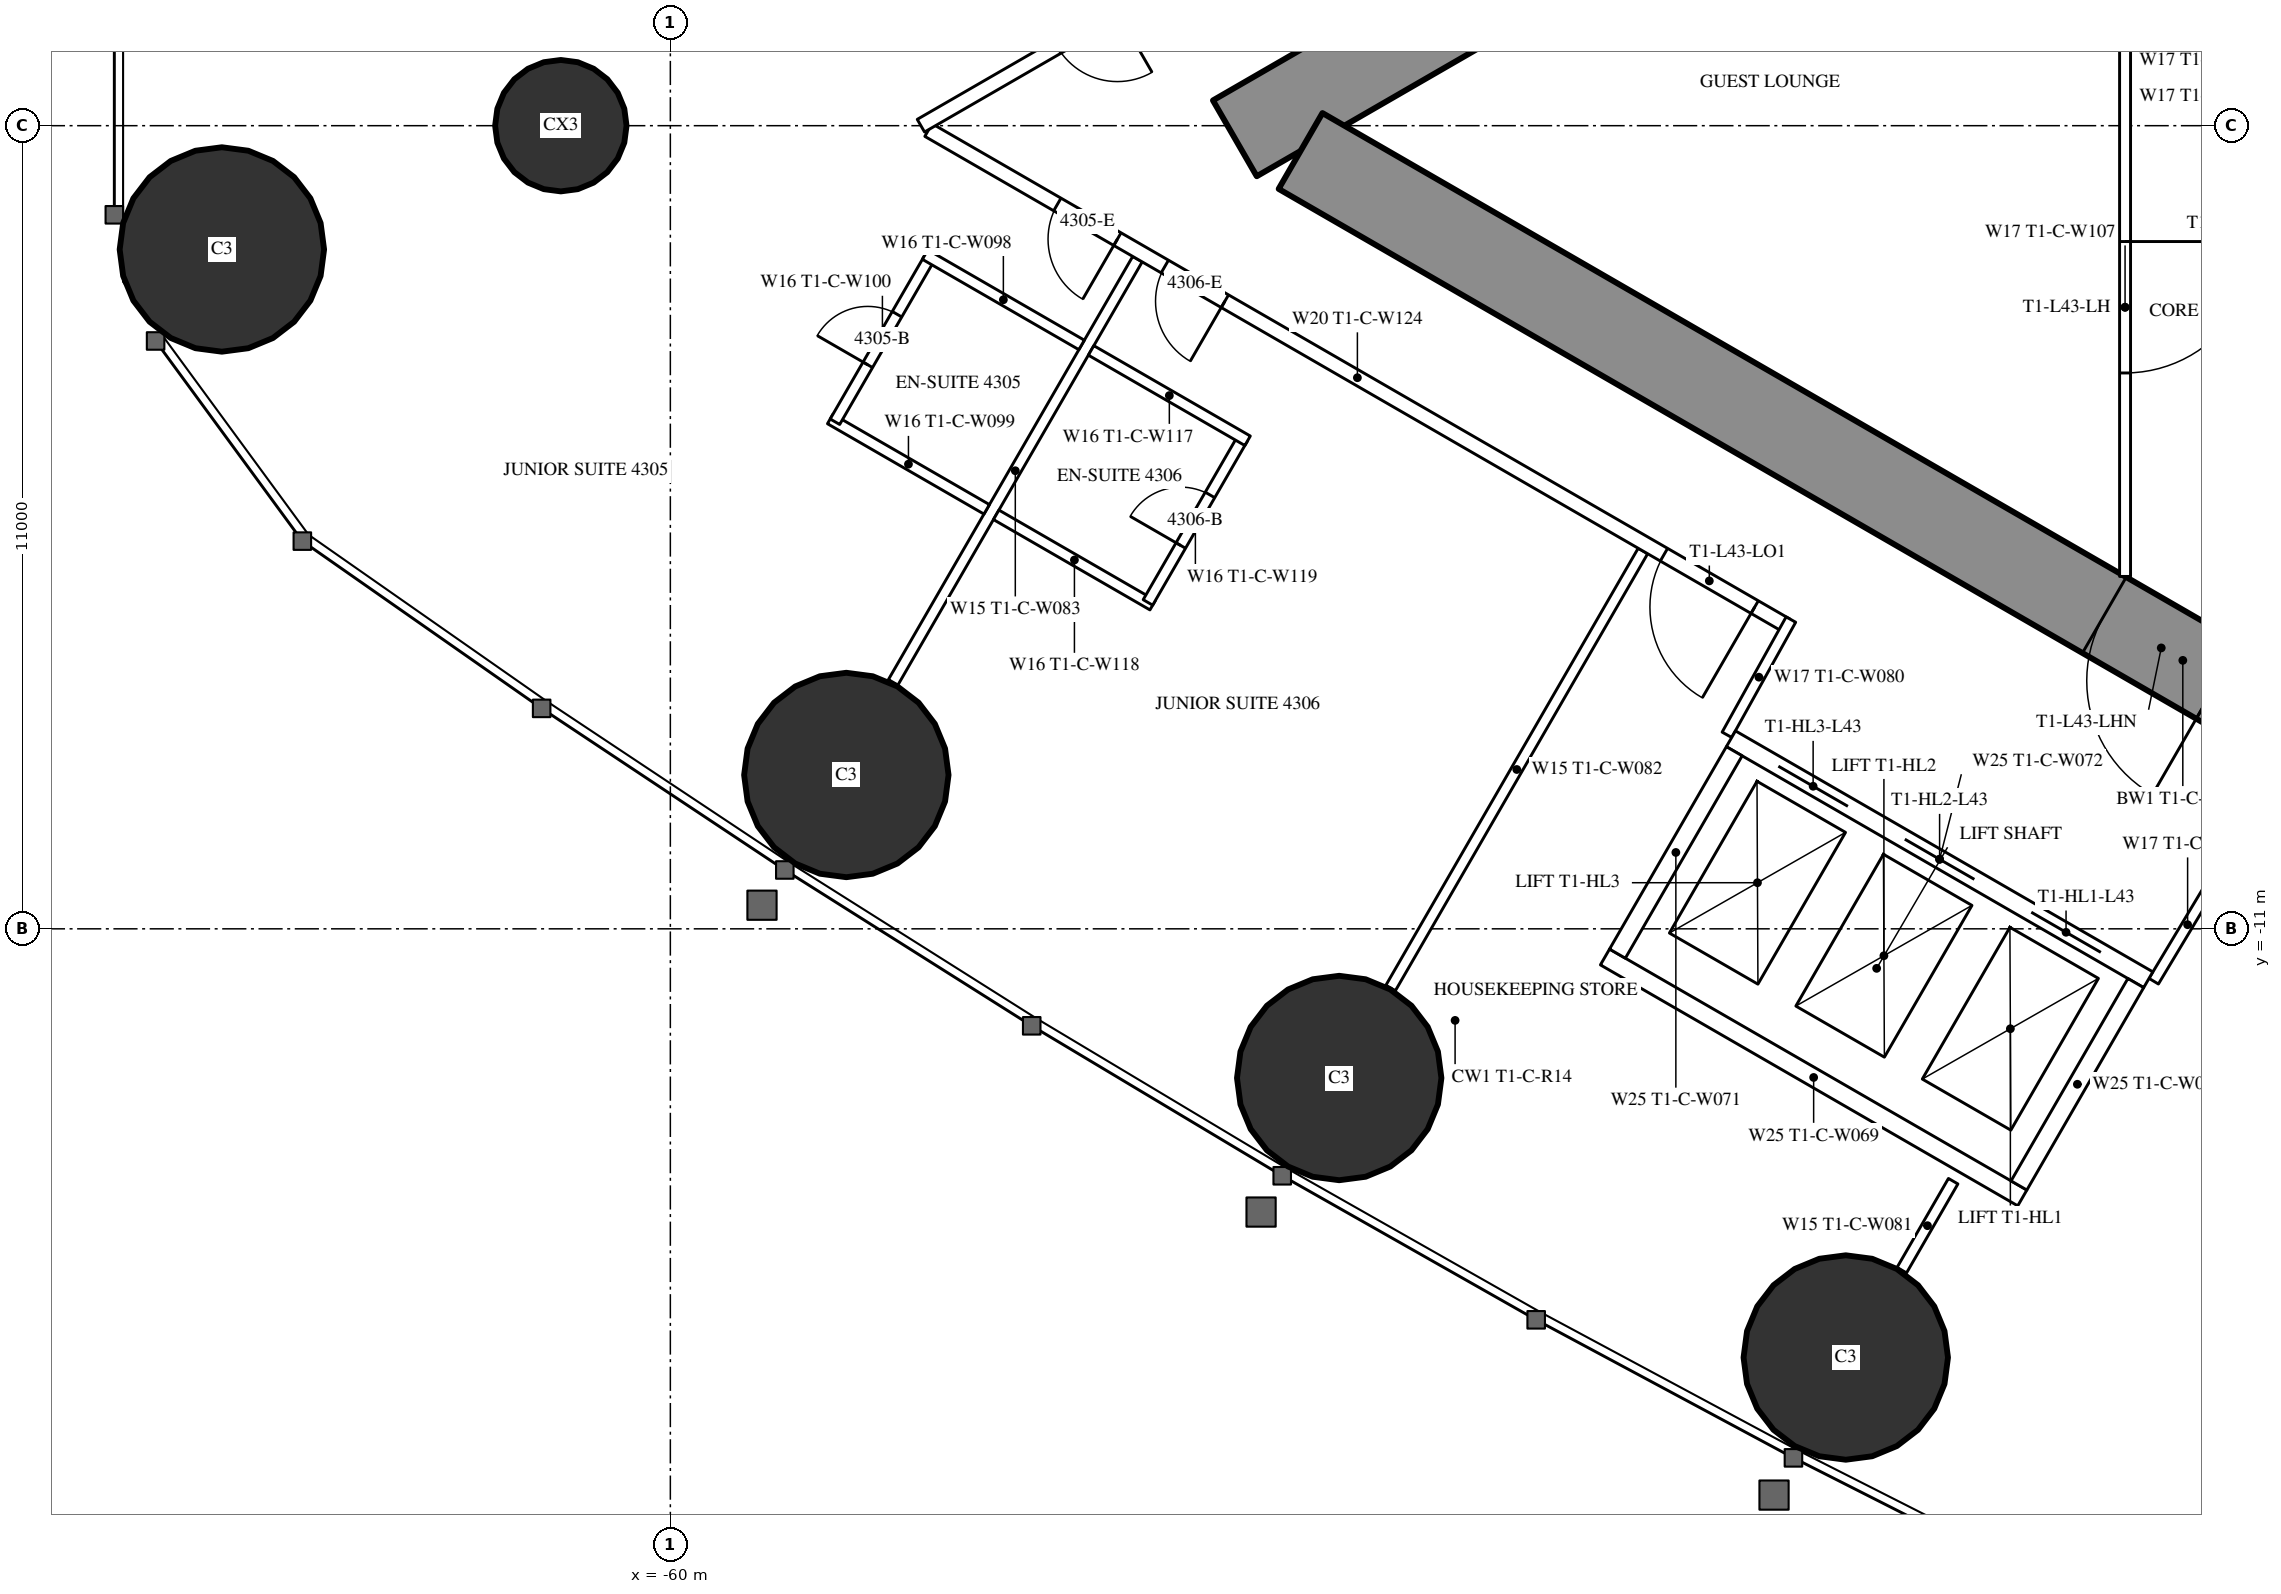
"""IFC4 building model, lengths in metres.
Left out: names, types, materials, properties, quantities, classifications, styles, units other than length and angle.
Written with IfcOpenShell. Run it as: python <this file> out.ifc"""

import sys

from ifc_helpers import new_model, si_unit, direction, frame, frame_2d, origin, origin_2d, place, context, subcontext, project, spatial, rectangle, circle, extrude, element, fill, save


model = new_model("IFC4")
c1 = context("Model", 3, precision=1e-05, world=origin(), true_north=direction((0.0, 1.0)))
c2 = subcontext(c1, "Body", "Model", "MODEL_VIEW")
j1 = project(units=[si_unit("LENGTHUNIT", "METRE"), si_unit("PLANEANGLEUNIT", "RADIAN")], contexts=[c1])
p1 = place(None, origin())
s1 = spatial("IfcSite", under=j1, at=p1, CompositionType="ELEMENT")
p2 = place(p1, origin())
s2 = spatial("IfcBuilding", under=s1, at=p2, CompositionType="ELEMENT")
p3 = place(p2, frame((0.0, 0.0, 163.3)))
s3 = spatial("IfcBuildingStorey", under=s2, at=p3, CompositionType="ELEMENT", Elevation=163.3)
for number, where, z_axis, x_axis in (
    (1, (-66.143, -1.695, 0.0), (0.0, 0.0, 1.0), (1.0, 0.0, 0.0)),
    (2, (-57.59, -8.893, 0.0), (0.0, 0.0, 1.0), (1.0, 0.0, 0.0)),
    (3, (-50.839, -13.043, 0.0), (0.0, 0.0, 1.0), (1.0, 0.0, 0.0)),
    (4, (-43.9, -16.871, 0.0), (0.0, 0.0, 1.0), (1.0, 0.0, 0.0)),
):
    element("IfcColumn", number, at=place(p3, frame(where, z_axis=z_axis, x_axis=x_axis)), inside=s3, PredefinedType="COLUMN", context=c2, shape_type="SweptSolid", body=[
        extrude(circle(Radius=1.4, at=origin_2d()), origin(), (0.0, 0.0, 1.0), 3.5),
    ])
p4 = place(p3, frame((-61.5, 0.0, 0.0), z_axis=(0.0, 0.0, 1.0), x_axis=(1.0, 0.0, 0.0)))
e5 = element("IfcColumn", 5, at=p4, inside=s3, PredefinedType="COLUMN", context=c2, shape_type="SweptSolid", body=[
    extrude(circle(Radius=0.9, at=origin_2d()), origin(), (0.0, 0.0, 1.0), 3.5),
])
p5 = place(p3, frame((-27.2, 14.3, 0.0), z_axis=(0.0, 0.0, 1.0), x_axis=(-0.866026593062, -0.499997940104, 0.0)))
e6 = element("IfcWall", 6, at=p5, inside=s3, PredefinedType="SHEAR", context=c2, shape_type="SweptSolid", body=[
    extrude(rectangle(XDim=28.946, YDim=1.2, at=frame_2d((14.473, 0.0))), origin(), (0.0, 0.0, 1.0), 3.5),
])
p6 = place(p5, frame((4.6, 0.0, 0.0)))
e7 = element("IfcOpeningElement", 7, at=p6, cuts=e6, PredefinedType="OPENING", context=c2, shape_type="SweptSolid", body=[
    extrude(rectangle(XDim=1.0, YDim=2.2, at=frame_2d((0.5, 1.1))), frame((0.0, 0.61, 0.0), z_axis=(0.0, -1.0, 0.0), x_axis=(1.0, 0.0, 0.0)), (0.0, 0.0, 1.0), 1.22),
])
p7 = place(p5, frame((13.395, 0.0, 0.0)))
e8 = element("IfcOpeningElement", 8, at=p7, cuts=e6, PredefinedType="OPENING", context=c2, shape_type="SweptSolid", body=[
    extrude(rectangle(XDim=1.8, YDim=2.2, at=frame_2d((0.9, 1.1))), frame((0.0, 0.61, 0.0), z_axis=(0.0, -1.0, 0.0), x_axis=(1.0, 0.0, 0.0)), (0.0, 0.0, 1.0), 1.22),
])
p8 = place(p3, frame((-27.2, -14.3, 0.0), z_axis=(0.0, 0.0, 1.0), x_axis=(-0.866024021859, 0.500002393557, 0.0)))
e9 = element("IfcWall", 9, at=p8, inside=s3, PredefinedType="SHEAR", context=c2, shape_type="SweptSolid", body=[
    extrude(rectangle(XDim=27.907, YDim=1.2, at=frame_2d((13.954, 0.0))), origin(), (0.0, 0.0, 1.0), 3.5),
])
p9 = place(p8, frame((4.6, 0.0, 0.0)))
e10 = element("IfcOpeningElement", 10, at=p9, cuts=e9, PredefinedType="OPENING", context=c2, shape_type="SweptSolid", body=[
    extrude(rectangle(XDim=1.0, YDim=2.2, at=frame_2d((0.5, 1.1))), frame((0.0, 0.61, 0.0), z_axis=(0.0, -1.0, 0.0), x_axis=(1.0, 0.0, 0.0)), (0.0, 0.0, 1.0), 1.22),
])
p10 = place(p8, frame((13.395, 0.0, 0.0)))
e11 = element("IfcOpeningElement", 11, at=p10, cuts=e9, PredefinedType="OPENING", context=c2, shape_type="SweptSolid", body=[
    extrude(rectangle(XDim=1.8, YDim=2.2, at=frame_2d((0.9, 1.1))), frame((0.0, 0.61, 0.0), z_axis=(0.0, -1.0, 0.0), x_axis=(1.0, 0.0, 0.0)), (0.0, 0.0, 1.0), 1.22),
])
p11 = place(p3, frame((-46.679, -5.825, 0.0), z_axis=(0.0, 0.0, 1.0), x_axis=(-0.500006839597, -0.866021454905, 0.0)))
e12 = element("IfcWall", 12, at=p11, inside=s3, PredefinedType="PARTITIONING", context=c2, shape_type="SweptSolid", body=[
    extrude(rectangle(XDim=6.911, YDim=0.15, at=frame_2d((3.456, 0.0))), origin(), (0.0, 0.0, 1.0), 2.3),
])
p12 = place(p3, frame((-53.602, -1.828, 0.0), z_axis=(0.0, 0.0, 1.0), x_axis=(-0.49999191814, -0.866030069798, 0.0)))
e13 = element("IfcWall", 13, at=p12, inside=s3, PredefinedType="PARTITIONING", context=c2, shape_type="SweptSolid", body=[
    extrude(rectangle(XDim=6.692, YDim=0.15, at=frame_2d((3.346, 0.0))), origin(), (0.0, 0.0, 1.0), 2.3),
])
p13 = place(p3, frame((-42.429, -14.457, 0.0), z_axis=(0.0, 0.0, 1.0), x_axis=(-0.5000578829, -0.865991982497, 0.0)))
e14 = element("IfcWall", 14, at=p13, inside=s3, PredefinedType="PARTITIONING", context=c2, shape_type="SweptSolid", body=[
    extrude(rectangle(XDim=1.407, YDim=0.15, at=frame_2d((0.704, 0.0))), origin(), (0.0, 0.0, 1.0), 3.25),
])
p14 = place(p3, frame((-44.715, -6.844, 0.0), z_axis=(0.0, 0.0, 1.0), x_axis=(-0.866025261224, 0.500000246922, 0.0)))
e15 = element("IfcWall", 15, at=p14, inside=s3, PredefinedType="PARTITIONING", context=c2, shape_type="SweptSolid", body=[
    extrude(rectangle(XDim=13.567, YDim=0.2, at=frame_2d((6.783, 0.0))), origin(), (0.0, 0.0, 1.0), 3.25),
])
p15 = place(p14, frame((10.579, 0.0, 0.0)))
e16 = element("IfcOpeningElement", 16, at=p15, cuts=e15, PredefinedType="OPENING", context=c2, shape_type="SweptSolid", body=[
    extrude(rectangle(XDim=0.95, YDim=2.2, at=frame_2d((0.475, 1.1))), frame((0.0, 0.11, 0.0), z_axis=(0.0, -1.0, 0.0), x_axis=(1.0, 0.0, 0.0)), (0.0, 0.0, 1.0), 0.22),
])
p16 = place(p14, frame((8.879, 0.0, 0.0)))
e17 = element("IfcOpeningElement", 17, at=p16, cuts=e15, PredefinedType="OPENING", context=c2, shape_type="SweptSolid", body=[
    extrude(rectangle(XDim=0.95, YDim=2.2, at=frame_2d((0.475, 1.1))), frame((0.0, 0.11, 0.0), z_axis=(0.0, -1.0, 0.0), x_axis=(1.0, 0.0, 0.0)), (0.0, 0.0, 1.0), 0.22),
])
p17 = place(p14, frame((0.5, 0.0, 0.0)))
e18 = element("IfcOpeningElement", 18, at=p17, cuts=e15, PredefinedType="OPENING", context=c2, shape_type="SweptSolid", body=[
    extrude(rectangle(XDim=1.435, YDim=2.2, at=frame_2d((0.718, 1.1))), frame((0.0, 0.11, 0.0), z_axis=(0.0, -1.0, 0.0), x_axis=(1.0, 0.0, 0.0)), (0.0, 0.0, 1.0), 0.22),
])
for number, where, z_axis, x_axis in (
    (19, (-39.683, -11.718, 0.0), (0.0, 0.0, 1.0), (0.514, 0.858, 0.0)),
    (20, (-44.652, -6.764, 0.0), (0.0, 0.0, 1.0), (-0.485, -0.874, 0.0)),
):
    element("IfcWall", number, at=place(p3, frame(where, z_axis=z_axis, x_axis=x_axis)), inside=s3, PredefinedType="PARTITIONING", context=c2, shape_type="SweptSolid", body=[
        extrude(rectangle(XDim=1.805, YDim=0.15, at=frame_2d((0.903, 0.0))), origin(), (0.0, 0.0, 1.0), 3.25),
    ])
p18 = place(p3, frame((-46.65, 5.726, 0.0), z_axis=(0.0, 0.0, 1.0), x_axis=(-0.866027963864, -0.499995565786, 0.0)))
e21 = element("IfcWall", 21, at=p18, inside=s3, PredefinedType="PARTITIONING", context=c2, shape_type="SweptSolid", body=[
    extrude(rectangle(XDim=11.452, YDim=0.2, at=frame_2d((5.726, 0.0))), origin(), (0.0, 0.0, 1.0), 3.25),
])
p19 = place(p18, frame((4.294, 0.0, 0.0)))
e22 = element("IfcOpeningElement", 22, at=p19, cuts=e21, PredefinedType="OPENING", context=c2, shape_type="SweptSolid", body=[
    extrude(rectangle(XDim=0.95, YDim=2.2, at=frame_2d((0.475, 1.1))), frame((0.0, 0.11, 0.0), z_axis=(0.0, -1.0, 0.0), x_axis=(1.0, 0.0, 0.0)), (0.0, 0.0, 1.0), 0.22),
])
p20 = place(p18, frame((8.344, 0.0, 0.0)))
e23 = element("IfcOpeningElement", 23, at=p20, cuts=e21, PredefinedType="OPENING", context=c2, shape_type="SweptSolid", body=[
    extrude(rectangle(XDim=0.95, YDim=2.2, at=frame_2d((0.475, 1.1))), frame((0.0, 0.11, 0.0), z_axis=(0.0, -1.0, 0.0), x_axis=(1.0, 0.0, 0.0)), (0.0, 0.0, 1.0), 0.22),
])
p21 = place(p3, frame((-55.667, -5.255, 0.0), z_axis=(0.0, 0.0, 1.0), x_axis=(-0.866006523861, 0.500032699561, 0.0)))
e24 = element("IfcWall", 24, at=p21, inside=s3, PredefinedType="PARTITIONING", context=c2, shape_type="SweptSolid", body=[
    extrude(rectangle(XDim=2.475, YDim=0.15, at=frame_2d((1.237, 0.0))), origin(), (0.0, 0.0, 1.0), 3.25),
])
p22 = place(p3, frame((-56.446, -1.803, 0.0), z_axis=(0.0, 0.0, 1.0), x_axis=(-0.499936506574, -0.866062058628, 0.0)))
e25 = element("IfcWall", 25, at=p22, inside=s3, PredefinedType="PARTITIONING", context=c2, shape_type="SweptSolid", body=[
    extrude(rectangle(XDim=2.6, YDim=0.15, at=frame_2d((1.3, 0.0))), origin(), (0.0, 0.0, 1.0), 3.25),
])
p23 = place(p22, frame((0.9, 0.0, 0.0)))
e26 = element("IfcOpeningElement", 26, at=p23, cuts=e25, PredefinedType="OPENING", context=c2, shape_type="SweptSolid", body=[
    extrude(rectangle(XDim=0.8, YDim=2.2, at=frame_2d((0.4, 1.1))), frame((0.0, 0.085, 0.0), z_axis=(0.0, -1.0, 0.0), x_axis=(1.0, 0.0, 0.0)), (0.0, 0.0, 1.0), 0.17),
])
for number, where, z_axis, x_axis in (
    (27, (-54.367, -3.003, 0.0), (0.0, 0.0, 1.0), (-0.866, 0.5, 0.0)),
    (28, (-53.394, -6.567, 0.0), (0.0, 0.0, 1.0), (-0.866, 0.5, 0.0)),
):
    element("IfcWall", number, at=place(p3, frame(where, z_axis=z_axis, x_axis=x_axis)), inside=s3, PredefinedType="PARTITIONING", context=c2, shape_type="SweptSolid", body=[
        extrude(rectangle(XDim=2.475, YDim=0.15, at=frame_2d((1.238, 0.0))), origin(), (0.0, 0.0, 1.0), 3.25),
    ])
p24 = place(p3, frame((-52.159, -4.278, 0.0), z_axis=(0.0, 0.0, 1.0), x_axis=(-0.500047596559, -0.865997922154, 0.0)))
e29 = element("IfcWall", 29, at=p24, inside=s3, PredefinedType="PARTITIONING", context=c2, shape_type="SweptSolid", body=[
    extrude(rectangle(XDim=2.6, YDim=0.15, at=frame_2d((1.3, 0.0))), origin(), (0.0, 0.0, 1.0), 3.25),
])
p25 = place(p24, frame((0.9, 0.0, 0.0)))
e30 = element("IfcOpeningElement", 30, at=p25, cuts=e29, PredefinedType="OPENING", context=c2, shape_type="SweptSolid", body=[
    extrude(rectangle(XDim=0.8, YDim=2.2, at=frame_2d((0.4, 1.1))), frame((0.0, 0.085, 0.0), z_axis=(0.0, -1.0, 0.0), x_axis=(1.0, 0.0, 0.0)), (0.0, 0.0, 1.0), 0.17),
])
p26 = place(p3, frame((-52.094, -4.315, 0.0), z_axis=(0.0, 0.0, 1.0), x_axis=(-0.866006523861, 0.500032699561, 0.0)))
e31 = element("IfcWall", 31, at=p26, inside=s3, PredefinedType="PARTITIONING", context=c2, shape_type="SweptSolid", body=[
    extrude(rectangle(XDim=2.475, YDim=0.15, at=frame_2d((1.237, 0.0))), origin(), (0.0, 0.0, 1.0), 2.45),
])
p27 = place(p3, frame((-40.075, 1.2, 0.0), z_axis=(0.0, 0.0, 1.0), x_axis=(0.0, -1.0, 0.0)))
e32 = element("IfcWall", 32, at=p27, inside=s3, PredefinedType="PARTITIONING", context=c2, shape_type="SweptSolid", body=[
    extrude(rectangle(XDim=7.374, YDim=0.15, at=frame_2d((3.687, 0.0))), origin(), (0.0, 0.0, 1.0), 3.25),
])
p28 = place(p27, frame((2.787, 0.0, 0.0)))
e33 = element("IfcOpeningElement", 33, at=p28, cuts=e32, PredefinedType="OPENING", context=c2, shape_type="SweptSolid", body=[
    extrude(rectangle(XDim=1.8, YDim=2.2, at=frame_2d((0.9, 1.1))), frame((0.0, 0.085, 0.0), z_axis=(0.0, -1.0, 0.0), x_axis=(1.0, 0.0, 0.0)), (0.0, 0.0, 1.0), 0.17),
])
p29 = place(p3, frame((-39.758, -11.697, 0.0), z_axis=(0.0, 0.0, 1.0), x_axis=(-0.866024194504, 0.500002094529, 0.0)))
e34 = element("IfcWall", 34, at=p29, inside=s3, PredefinedType="PARTITIONING", context=c2, shape_type="SweptSolid", body=[
    extrude(rectangle(XDim=6.6, YDim=0.25, at=frame_2d((3.3, 0.0))), origin(), (0.0, 0.0, 1.0), 3.25),
])
p30 = place(p29, frame((0.75, 0.0, 0.0)))
e35 = element("IfcOpeningElement", 35, at=p30, cuts=e34, PredefinedType="OPENING", context=c2, shape_type="SweptSolid", body=[
    extrude(rectangle(XDim=1.1, YDim=2.2, at=frame_2d((0.55, 1.1))), frame((0.0, 0.135, 0.0), z_axis=(0.0, -1.0, 0.0), x_axis=(1.0, 0.0, 0.0)), (0.0, 0.0, 1.0), 0.27),
])
p31 = place(p29, frame((2.75, 0.0, 0.0)))
e36 = element("IfcOpeningElement", 36, at=p31, cuts=e34, PredefinedType="OPENING", context=c2, shape_type="SweptSolid", body=[
    extrude(rectangle(XDim=1.1, YDim=2.2, at=frame_2d((0.55, 1.1))), frame((0.0, 0.135, 0.0), z_axis=(0.0, -1.0, 0.0), x_axis=(1.0, 0.0, 0.0)), (0.0, 0.0, 1.0), 0.27),
])
p32 = place(p29, frame((4.75, 0.0, 0.0)))
e37 = element("IfcOpeningElement", 37, at=p32, cuts=e34, PredefinedType="OPENING", context=c2, shape_type="SweptSolid", body=[
    extrude(rectangle(XDim=1.1, YDim=2.2, at=frame_2d((0.55, 1.1))), frame((0.0, 0.135, 0.0), z_axis=(0.0, -1.0, 0.0), x_axis=(1.0, 0.0, 0.0)), (0.0, 0.0, 1.0), 0.27),
])
p33 = place(p3, frame((-41.482, -14.686, 0.0), z_axis=(0.0, 0.0, 1.0), x_axis=(-0.86603344179, 0.499986077507, 0.0)))
e38 = element("IfcWall", 38, at=p33, inside=s3, PredefinedType="PARTITIONING", context=c2, shape_type="SweptSolid", body=[
    extrude(rectangle(XDim=6.6, YDim=0.25, at=frame_2d((3.3, 0.0))), origin(), (0.0, 0.0, 1.0), 3.25),
])
for number, where, z_axis, x_axis in (
    (39, (-39.928, -11.743, 0.0), (0.0, 0.0, 1.0), (-0.5, -0.866, 0.0)),
    (40, (-45.428, -8.568, 0.0), (0.0, 0.0, 1.0), (-0.5, -0.866, 0.0)),
):
    element("IfcWall", number, at=place(p3, frame(where, z_axis=z_axis, x_axis=x_axis)), inside=s3, PredefinedType="PARTITIONING", context=c2, shape_type="SweptSolid", body=[
        extrude(rectangle(XDim=3.201, YDim=0.25, at=frame_2d((1.6, 0.0))), origin(), (0.0, 0.0, 1.0), 3.25),
    ])
p34 = place(p23, origin())
e41 = element("IfcDoor", 41, at=p34, inside=s3, OperationType="SINGLE_SWING_RIGHT", PredefinedType="DOOR", context=c2, shape_type="SweptSolid", body=[
    extrude(rectangle(XDim=0.8, YDim=2.2, at=frame_2d((0.4, 1.1))), frame((0.0, 0.025, 0.0), z_axis=(0.0, -1.0, 0.0), x_axis=(1.0, 0.0, 0.0)), (0.0, 0.0, 1.0), 0.05),
])
fill(e26, e41)
p35 = place(p15, origin())
e42 = element("IfcDoor", 42, at=p35, inside=s3, OperationType="SINGLE_SWING_LEFT", PredefinedType="DOOR", context=c2, shape_type="SweptSolid", body=[
    extrude(rectangle(XDim=0.95, YDim=2.2, at=frame_2d((0.475, 1.1))), frame((0.0, 0.025, 0.0), z_axis=(0.0, -1.0, 0.0), x_axis=(1.0, 0.0, 0.0)), (0.0, 0.0, 1.0), 0.05),
])
fill(e16, e42)
p36 = place(p25, origin())
e43 = element("IfcDoor", 43, at=p36, inside=s3, OperationType="SINGLE_SWING_RIGHT", PredefinedType="DOOR", context=c2, shape_type="SweptSolid", body=[
    extrude(rectangle(XDim=0.8, YDim=2.2, at=frame_2d((0.4, 1.1))), frame((0.0, 0.025, 0.0), z_axis=(0.0, -1.0, 0.0), x_axis=(1.0, 0.0, 0.0)), (0.0, 0.0, 1.0), 0.05),
])
fill(e30, e43)
p37 = place(p16, origin())
e44 = element("IfcDoor", 44, at=p37, inside=s3, OperationType="SINGLE_SWING_LEFT", PredefinedType="DOOR", context=c2, shape_type="SweptSolid", body=[
    extrude(rectangle(XDim=0.95, YDim=2.2, at=frame_2d((0.475, 1.1))), frame((0.0, 0.025, 0.0), z_axis=(0.0, -1.0, 0.0), x_axis=(1.0, 0.0, 0.0)), (0.0, 0.0, 1.0), 0.05),
])
fill(e17, e44)
p38 = place(p17, origin())
e45 = element("IfcDoor", 45, at=p38, inside=s3, OperationType="SINGLE_SWING_LEFT", PredefinedType="DOOR", context=c2, shape_type="SweptSolid", body=[
    extrude(rectangle(XDim=1.435, YDim=2.2, at=frame_2d((0.718, 1.1))), frame((0.0, 0.025, 0.0), z_axis=(0.0, -1.0, 0.0), x_axis=(1.0, 0.0, 0.0)), (0.0, 0.0, 1.0), 0.05),
])
fill(e18, e45)
p39 = place(p28, origin())
e46 = element("IfcDoor", 46, at=p39, inside=s3, OperationType="DOUBLE_DOOR_SINGLE_SWING", PredefinedType="DOOR", context=c2, shape_type="SweptSolid", body=[
    extrude(rectangle(XDim=1.8, YDim=2.2, at=frame_2d((0.9, 1.1))), frame((0.0, 0.025, 0.0), z_axis=(0.0, -1.0, 0.0), x_axis=(1.0, 0.0, 0.0)), (0.0, 0.0, 1.0), 0.05),
])
fill(e33, e46)
p40 = place(p10, origin())
e47 = element("IfcDoor", 47, at=p40, inside=s3, OperationType="DOUBLE_DOOR_SINGLE_SWING", PredefinedType="DOOR", context=c2, shape_type="SweptSolid", body=[
    extrude(rectangle(XDim=1.8, YDim=2.2, at=frame_2d((0.9, 1.1))), frame((0.0, 0.025, 0.0), z_axis=(0.0, -1.0, 0.0), x_axis=(1.0, 0.0, 0.0)), (0.0, 0.0, 1.0), 0.05),
])
fill(e11, e47)
p41 = place(p30, origin())
e48 = element("IfcDoor", 48, at=p41, inside=s3, OperationType="DOUBLE_DOOR_SLIDING", PredefinedType="USERDEFINED", context=c2, shape_type="SweptSolid", body=[
    extrude(rectangle(XDim=1.1, YDim=2.2, at=frame_2d((0.55, 1.1))), frame((0.0, 0.025, 0.0), z_axis=(0.0, -1.0, 0.0), x_axis=(1.0, 0.0, 0.0)), (0.0, 0.0, 1.0), 0.05),
])
fill(e35, e48)
p42 = place(p31, origin())
e49 = element("IfcDoor", 49, at=p42, inside=s3, OperationType="DOUBLE_DOOR_SLIDING", PredefinedType="USERDEFINED", context=c2, shape_type="SweptSolid", body=[
    extrude(rectangle(XDim=1.1, YDim=2.2, at=frame_2d((0.55, 1.1))), frame((0.0, 0.025, 0.0), z_axis=(0.0, -1.0, 0.0), x_axis=(1.0, 0.0, 0.0)), (0.0, 0.0, 1.0), 0.05),
])
fill(e36, e49)
p43 = place(p32, origin())
e50 = element("IfcDoor", 50, at=p43, inside=s3, OperationType="DOUBLE_DOOR_SLIDING", PredefinedType="USERDEFINED", context=c2, shape_type="SweptSolid", body=[
    extrude(rectangle(XDim=1.1, YDim=2.2, at=frame_2d((0.55, 1.1))), frame((0.0, 0.025, 0.0), z_axis=(0.0, -1.0, 0.0), x_axis=(1.0, 0.0, 0.0)), (0.0, 0.0, 1.0), 0.05),
])
fill(e37, e50)
save(model, sys.argv[1])
